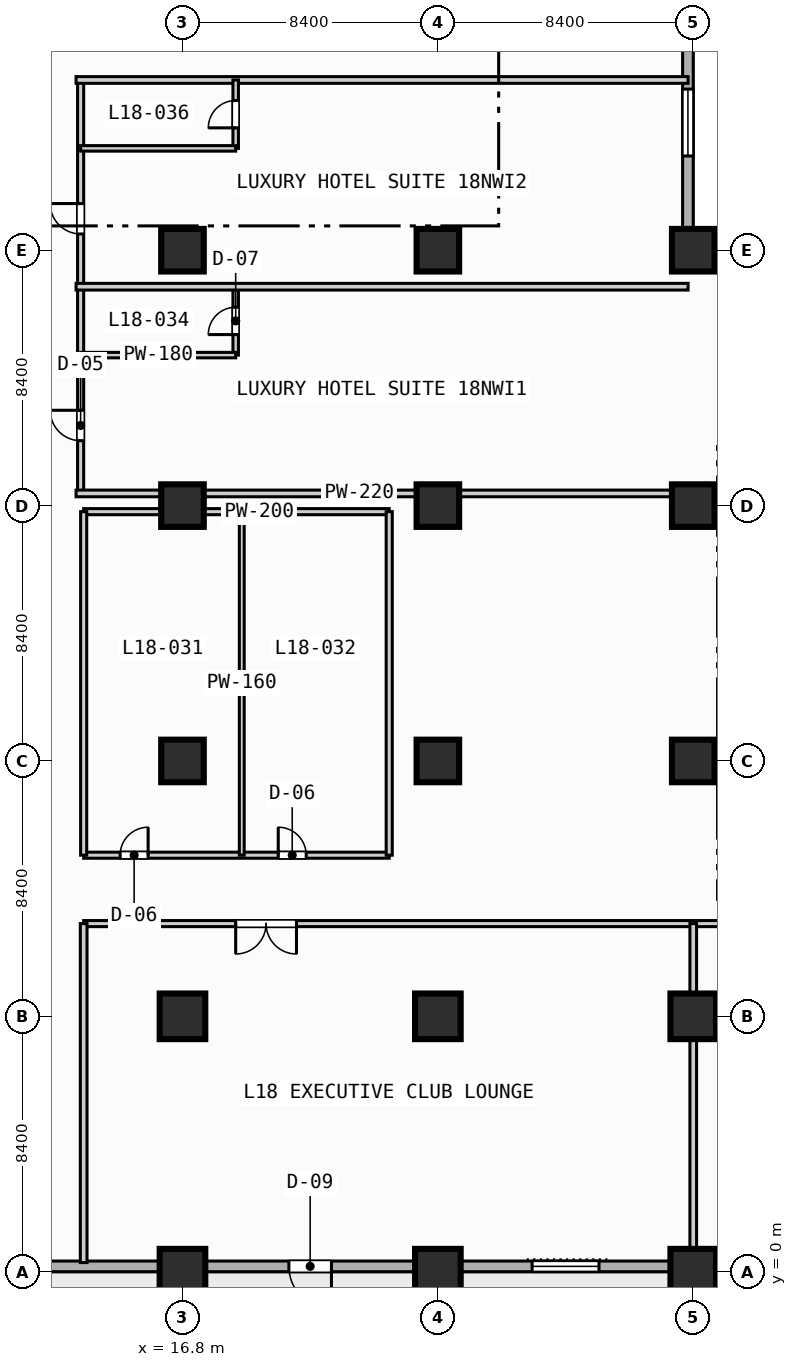
"""IFC4 building model, lengths in metres.
Left out: names, types, materials, properties, quantities, classifications, styles, units other than length and angle.
Written with IfcOpenShell. Run it as: python <this file> out.ifc"""

import sys

from ifc_helpers import new_model, si_unit, direction, frame, frame_2d, origin, origin_2d, place, context, subcontext, project, spatial, rectangle, extrude, element, fill, save


model = new_model("IFC4")
c1 = context("Model", 3, precision=1e-05, world=origin(), true_north=direction((0.0, 1.0)))
c2 = subcontext(c1, "Body", "Model", "MODEL_VIEW")
j1 = project(units=[si_unit("LENGTHUNIT", "METRE"), si_unit("PLANEANGLEUNIT", "RADIAN")], contexts=[c1])
p1 = place(None, origin())
s1 = spatial("IfcSite", under=j1, at=p1, CompositionType="ELEMENT")
p2 = place(p1, origin())
s2 = spatial("IfcBuilding", under=s1, at=p2, CompositionType="ELEMENT")
p3 = place(p2, frame((0.0, 0.0, 77.6)))
s3 = spatial("IfcBuildingStorey", under=s2, at=p3, CompositionType="ELEMENT", Elevation=77.6)
for number, where, z_axis, x_axis in (
    (1, (16.8, 0.0, 0.0), (0.0, 0.0, 1.0), (1.0, 0.0, 0.0)),
    (2, (16.8, 8.4, 0.0), (0.0, 0.0, 1.0), (1.0, 0.0, 0.0)),
):
    element("IfcColumn", number, at=place(p3, frame(where, z_axis=z_axis, x_axis=x_axis)), inside=s3, PredefinedType="COLUMN", context=c2, shape_type="SweptSolid", body=[
        extrude(rectangle(XDim=1.5, YDim=1.5, at=origin_2d()), origin(), (0.0, 0.0, 1.0), 3.8),
    ])
for number, where, z_axis, x_axis in (
    (3, (16.8, 16.8, 0.0), (0.0, 0.0, 1.0), (1.0, 0.0, 0.0)),
    (4, (16.8, 25.2, 0.0), (0.0, 0.0, 1.0), (1.0, 0.0, 0.0)),
    (5, (16.8, 33.6, 0.0), (0.0, 0.0, 1.0), (1.0, 0.0, 0.0)),
):
    element("IfcColumn", number, at=place(p3, frame(where, z_axis=z_axis, x_axis=x_axis)), inside=s3, PredefinedType="COLUMN", context=c2, shape_type="SweptSolid", body=[
        extrude(rectangle(XDim=1.4, YDim=1.4, at=origin_2d()), origin(), (0.0, 0.0, 1.0), 3.8),
    ])
for number, where, z_axis, x_axis in (
    (6, (25.2, 0.0, 0.0), (0.0, 0.0, 1.0), (1.0, 0.0, 0.0)),
    (7, (25.2, 8.4, 0.0), (0.0, 0.0, 1.0), (1.0, 0.0, 0.0)),
):
    element("IfcColumn", number, at=place(p3, frame(where, z_axis=z_axis, x_axis=x_axis)), inside=s3, PredefinedType="COLUMN", context=c2, shape_type="SweptSolid", body=[
        extrude(rectangle(XDim=1.5, YDim=1.5, at=origin_2d()), origin(), (0.0, 0.0, 1.0), 3.8),
    ])
for number, where, z_axis, x_axis in (
    (8, (25.2, 16.8, 0.0), (0.0, 0.0, 1.0), (1.0, 0.0, 0.0)),
    (9, (25.2, 25.2, 0.0), (0.0, 0.0, 1.0), (1.0, 0.0, 0.0)),
    (10, (25.2, 33.6, 0.0), (0.0, 0.0, 1.0), (1.0, 0.0, 0.0)),
):
    element("IfcColumn", number, at=place(p3, frame(where, z_axis=z_axis, x_axis=x_axis)), inside=s3, PredefinedType="COLUMN", context=c2, shape_type="SweptSolid", body=[
        extrude(rectangle(XDim=1.4, YDim=1.4, at=origin_2d()), origin(), (0.0, 0.0, 1.0), 3.8),
    ])
for number, where, z_axis, x_axis in (
    (11, (33.6, 0.0, 0.0), (0.0, 0.0, 1.0), (1.0, 0.0, 0.0)),
    (12, (33.6, 8.4, 0.0), (0.0, 0.0, 1.0), (1.0, 0.0, 0.0)),
):
    element("IfcColumn", number, at=place(p3, frame(where, z_axis=z_axis, x_axis=x_axis)), inside=s3, PredefinedType="COLUMN", context=c2, shape_type="SweptSolid", body=[
        extrude(rectangle(XDim=1.5, YDim=1.5, at=origin_2d()), origin(), (0.0, 0.0, 1.0), 3.8),
    ])
for number, where, z_axis, x_axis in (
    (13, (33.6, 16.8, 0.0), (0.0, 0.0, 1.0), (1.0, 0.0, 0.0)),
    (14, (33.6, 25.2, 0.0), (0.0, 0.0, 1.0), (1.0, 0.0, 0.0)),
    (15, (33.6, 33.6, 0.0), (0.0, 0.0, 1.0), (1.0, 0.0, 0.0)),
):
    element("IfcColumn", number, at=place(p3, frame(where, z_axis=z_axis, x_axis=x_axis)), inside=s3, PredefinedType="COLUMN", context=c2, shape_type="SweptSolid", body=[
        extrude(rectangle(XDim=1.4, YDim=1.4, at=origin_2d()), origin(), (0.0, 0.0, 1.0), 3.8),
    ])
p4 = place(p3, frame((33.425, 89.225, 0.0), z_axis=(0.0, 0.0, 1.0), x_axis=(0.0, -1.0, 0.0)))
e16 = element("IfcWall", 16, at=p4, inside=s3, PredefinedType="STANDARD", context=c2, shape_type="SweptSolid", body=[
    extrude(rectangle(XDim=55.8, YDim=0.35, at=frame_2d((27.9, 0.0))), origin(), (0.0, 0.0, 1.0), 3.55),
])
p5 = place(p4, frame((50.325, 0.0, 0.85)))
e17 = element("IfcOpeningElement", 17, at=p5, cuts=e16, PredefinedType="OPENING", context=c2, shape_type="SweptSolid", body=[
    extrude(rectangle(XDim=2.2, YDim=1.8, at=frame_2d((1.1, 0.9))), frame((0.0, 0.185, 0.0), z_axis=(0.0, -1.0, 0.0), x_axis=(1.0, 0.0, 0.0)), (0.0, 0.0, 1.0), 0.37),
])
p6 = place(p3, frame((33.425, 33.425, 0.0), z_axis=(0.0, 0.0, 1.0), x_axis=(1.0, 0.0, 0.0)))
e18 = element("IfcWall", 18, at=p6, inside=s3, PredefinedType="STANDARD", context=c2, shape_type="SweptSolid", body=[
    extrude(rectangle(XDim=55.8, YDim=0.35, at=frame_2d((27.9, 0.0))), origin(), (0.0, 0.0, 1.0), 3.55),
])
p7 = place(p6, frame((12.075, 0.0, 0.0)))
e19 = element("IfcOpeningElement", 19, at=p7, cuts=e18, PredefinedType="OPENING", context=c2, shape_type="SweptSolid", body=[
    extrude(rectangle(XDim=1.4, YDim=2.2, at=frame_2d((0.7, 1.1))), frame((0.0, 0.185, 0.0), z_axis=(0.0, -1.0, 0.0), x_axis=(1.0, 0.0, 0.0)), (0.0, 0.0, 1.0), 0.37),
])
p8 = place(p3, frame((89.225, 0.175, 0.0), z_axis=(0.0, 0.0, 1.0), x_axis=(-1.0, 0.0, 0.0)))
e20 = element("IfcWall", 20, at=p8, inside=s3, PredefinedType="STANDARD", context=c2, shape_type="SweptSolid", body=[
    extrude(rectangle(XDim=86.05, YDim=0.35, at=frame_2d((43.025, 0.0))), origin(), (0.0, 0.0, 1.0), 3.55),
])
p9 = place(p8, frame((67.525, 0.0, 0.0)))
e21 = element("IfcOpeningElement", 21, at=p9, cuts=e20, PredefinedType="OPENING", context=c2, shape_type="SweptSolid", body=[
    extrude(rectangle(XDim=1.4, YDim=2.2, at=frame_2d((0.7, 1.1))), frame((0.0, 0.185, 0.0), z_axis=(0.0, -1.0, 0.0), x_axis=(1.0, 0.0, 0.0)), (0.0, 0.0, 1.0), 0.37),
])
p10 = place(p8, frame((58.725, 0.0, 0.85)))
e22 = element("IfcOpeningElement", 22, at=p10, cuts=e20, PredefinedType="OPENING", context=c2, shape_type="SweptSolid", body=[
    extrude(rectangle(XDim=2.2, YDim=1.8, at=frame_2d((1.1, 0.9))), frame((0.0, 0.185, 0.0), z_axis=(0.0, -1.0, 0.0), x_axis=(1.0, 0.0, 0.0)), (0.0, 0.0, 1.0), 0.37),
])
p11 = place(p8, frame((50.325, 0.0, 0.85)))
e23 = element("IfcOpeningElement", 23, at=p11, cuts=e20, PredefinedType="OPENING", context=c2, shape_type="SweptSolid", body=[
    extrude(rectangle(XDim=2.2, YDim=1.8, at=frame_2d((1.1, 0.9))), frame((0.0, 0.185, 0.0), z_axis=(0.0, -1.0, 0.0), x_axis=(1.0, 0.0, 0.0)), (0.0, 0.0, 1.0), 0.37),
])
p12 = place(p8, frame((41.925, 0.0, 0.85)))
e24 = element("IfcOpeningElement", 24, at=p12, cuts=e20, PredefinedType="OPENING", context=c2, shape_type="SweptSolid", body=[
    extrude(rectangle(XDim=2.2, YDim=1.8, at=frame_2d((1.1, 0.9))), frame((0.0, 0.185, 0.0), z_axis=(0.0, -1.0, 0.0), x_axis=(1.0, 0.0, 0.0)), (0.0, 0.0, 1.0), 0.37),
])
p13 = place(p8, frame((27.575, 0.0, 0.85)))
e25 = element("IfcOpeningElement", 25, at=p13, cuts=e20, PredefinedType="OPENING", context=c2, shape_type="SweptSolid", body=[
    extrude(rectangle(XDim=1.8, YDim=1.8, at=frame_2d((0.9, 0.9))), frame((0.0, 0.185, 0.0), z_axis=(0.0, -1.0, 0.0), x_axis=(1.0, 0.0, 0.0)), (0.0, 0.0, 1.0), 0.37),
])
p14 = place(p8, frame((19.175, 0.0, 0.85)))
e26 = element("IfcOpeningElement", 26, at=p14, cuts=e20, PredefinedType="OPENING", context=c2, shape_type="SweptSolid", body=[
    extrude(rectangle(XDim=1.8, YDim=1.8, at=frame_2d((0.9, 0.9))), frame((0.0, 0.185, 0.0), z_axis=(0.0, -1.0, 0.0), x_axis=(1.0, 0.0, 0.0)), (0.0, 0.0, 1.0), 0.37),
])
p15 = place(p8, frame((10.775, 0.0, 0.85)))
e27 = element("IfcOpeningElement", 27, at=p15, cuts=e20, PredefinedType="OPENING", context=c2, shape_type="SweptSolid", body=[
    extrude(rectangle(XDim=1.8, YDim=1.8, at=frame_2d((0.9, 0.9))), frame((0.0, 0.185, 0.0), z_axis=(0.0, -1.0, 0.0), x_axis=(1.0, 0.0, 0.0)), (0.0, 0.0, 1.0), 0.37),
])
p16 = place(p8, frame((2.425, 0.0, 0.85)))
e28 = element("IfcOpeningElement", 28, at=p16, cuts=e20, PredefinedType="OPENING", context=c2, shape_type="SweptSolid", body=[
    extrude(rectangle(XDim=1.8, YDim=1.8, at=frame_2d((0.9, 0.9))), frame((0.0, 0.185, 0.0), z_axis=(0.0, -1.0, 0.0), x_axis=(1.0, 0.0, 0.0)), (0.0, 0.0, 1.0), 0.37),
])
p17 = place(p3, frame((13.55, 13.7, 0.0), z_axis=(0.0, 0.0, 1.0), x_axis=(1.0, 0.0, 0.0)))
e29 = element("IfcWall", 29, at=p17, inside=s3, PredefinedType="PARTITIONING", context=c2, shape_type="SweptSolid", body=[
    extrude(rectangle(XDim=10.05, YDim=0.2, at=frame_2d((5.025, 0.0))), origin(), (0.0, 0.0, 1.0), 3.55),
])
p18 = place(p17, frame((1.2, 0.0, 0.0)))
e30 = element("IfcOpeningElement", 30, at=p18, cuts=e29, PredefinedType="OPENING", context=c2, shape_type="SweptSolid", body=[
    extrude(rectangle(XDim=0.92, YDim=2.1, at=frame_2d((0.46, 1.05))), frame((0.0, 0.11, 0.0), z_axis=(0.0, -1.0, 0.0), x_axis=(1.0, 0.0, 0.0)), (0.0, 0.0, 1.0), 0.22),
])
p19 = place(p17, frame((6.4, 0.0, 0.0)))
e31 = element("IfcOpeningElement", 31, at=p19, cuts=e29, PredefinedType="OPENING", context=c2, shape_type="SweptSolid", body=[
    extrude(rectangle(XDim=0.92, YDim=2.1, at=frame_2d((0.46, 1.05))), frame((0.0, 0.11, 0.0), z_axis=(0.0, -1.0, 0.0), x_axis=(1.0, 0.0, 0.0)), (0.0, 0.0, 1.0), 0.22),
])
p20 = place(p3, frame((18.75, 13.7, 0.0), z_axis=(0.0, 0.0, 1.0), x_axis=(0.0, 1.0, 0.0)))
e32 = element("IfcWall", 32, at=p20, inside=s3, PredefinedType="PARTITIONING", context=c2, shape_type="SweptSolid", body=[
    extrude(rectangle(XDim=11.3, YDim=0.16, at=frame_2d((5.65, 0.0))), origin(), (0.0, 0.0, 1.0), 3.55),
])
p21 = place(p3, frame((13.55, 25.0, 0.0), z_axis=(0.0, 0.0, 1.0), x_axis=(1.0, 0.0, 0.0)))
e33 = element("IfcWall", 33, at=p21, inside=s3, PredefinedType="PARTITIONING", context=c2, shape_type="SweptSolid", body=[
    extrude(rectangle(XDim=10.05, YDim=0.2, at=frame_2d((5.025, 0.0))), origin(), (0.0, 0.0, 1.0), 2.8),
])
for number, where, z_axis, x_axis in (
    (34, (13.55, 13.7, 0.0), (0.0, 0.0, 1.0), (0.0, 1.0, 0.0)),
    (35, (23.6, 13.7, 0.0), (0.0, 0.0, 1.0), (0.0, 1.0, 0.0)),
):
    element("IfcWall", number, at=place(p3, frame(where, z_axis=z_axis, x_axis=x_axis)), inside=s3, PredefinedType="PARTITIONING", context=c2, shape_type="SweptSolid", body=[
        extrude(rectangle(XDim=11.3, YDim=0.2, at=frame_2d((5.65, 0.0))), origin(), (0.0, 0.0, 1.0), 3.55),
    ])
p22 = place(p3, frame((13.45, 25.6, 0.0), z_axis=(0.0, 0.0, 1.0), x_axis=(0.0, 1.0, 0.0)))
e36 = element("IfcWall", 36, at=p22, inside=s3, PredefinedType="PARTITIONING", context=c2, shape_type="SweptSolid", body=[
    extrude(rectangle(XDim=13.6, YDim=0.2, at=frame_2d((6.8, 0.0))), origin(), (0.0, 0.0, 1.0), 3.55),
])
p23 = place(p22, frame((1.735, 0.0, 0.0)))
e37 = element("IfcOpeningElement", 37, at=p23, cuts=e36, PredefinedType="OPENING", context=c2, shape_type="SweptSolid", body=[
    extrude(rectangle(XDim=1.0, YDim=2.15, at=frame_2d((0.5, 1.075))), frame((0.0, 0.11, 0.0), z_axis=(0.0, -1.0, 0.0), x_axis=(1.0, 0.0, 0.0)), (0.0, 0.0, 1.0), 0.22),
])
p24 = place(p22, frame((8.535, 0.0, 0.0)))
e38 = element("IfcOpeningElement", 38, at=p24, cuts=e36, PredefinedType="OPENING", context=c2, shape_type="SweptSolid", body=[
    extrude(rectangle(XDim=1.0, YDim=2.15, at=frame_2d((0.5, 1.075))), frame((0.0, 0.11, 0.0), z_axis=(0.0, -1.0, 0.0), x_axis=(1.0, 0.0, 0.0)), (0.0, 0.0, 1.0), 0.22),
])
p25 = place(p3, frame((13.3, 25.6, 0.0), z_axis=(0.0, 0.0, 1.0), x_axis=(1.0, 0.0, 0.0)))
e39 = element("IfcWall", 39, at=p25, inside=s3, PredefinedType="PARTITIONING", context=c2, shape_type="SweptSolid", body=[
    extrude(rectangle(XDim=20.13, YDim=0.22, at=frame_2d((10.065, 0.0))), origin(), (0.0, 0.0, 1.0), 3.55),
])
p26 = place(p3, frame((18.55, 30.15, 0.0), z_axis=(0.0, 0.0, 1.0), x_axis=(0.0, 1.0, 0.0)))
e40 = element("IfcWall", 40, at=p26, inside=s3, PredefinedType="PLUMBINGWALL", context=c2, shape_type="SweptSolid", body=[
    extrude(rectangle(XDim=2.25, YDim=0.18, at=frame_2d((1.125, 0.0))), origin(), (0.0, 0.0, 1.0), 3.55),
])
p27 = place(p26, frame((0.675, 0.0, 0.0)))
e41 = element("IfcOpeningElement", 41, at=p27, cuts=e40, PredefinedType="OPENING", context=c2, shape_type="SweptSolid", body=[
    extrude(rectangle(XDim=0.9, YDim=2.1, at=frame_2d((0.45, 1.05))), frame((0.0, 0.1, 0.0), z_axis=(0.0, -1.0, 0.0), x_axis=(1.0, 0.0, 0.0)), (0.0, 0.0, 1.0), 0.2),
])
p28 = place(p3, frame((13.45, 30.15, 0.0), z_axis=(0.0, 0.0, 1.0), x_axis=(1.0, 0.0, 0.0)))
e42 = element("IfcWall", 42, at=p28, inside=s3, PredefinedType="PLUMBINGWALL", context=c2, shape_type="SweptSolid", body=[
    extrude(rectangle(XDim=5.1, YDim=0.18, at=frame_2d((2.55, 0.0))), origin(), (0.0, 0.0, 1.0), 3.55),
])
for number, where, z_axis, x_axis in (
    (43, (13.3, 32.4, 0.0), (0.0, 0.0, 1.0), (1.0, 0.0, 0.0)),
    (44, (13.3, 39.2, 0.0), (0.0, 0.0, 1.0), (1.0, 0.0, 0.0)),
):
    element("IfcWall", number, at=place(p3, frame(where, z_axis=z_axis, x_axis=x_axis)), inside=s3, PredefinedType="PARTITIONING", context=c2, shape_type="SweptSolid", body=[
        extrude(rectangle(XDim=20.13, YDim=0.22, at=frame_2d((10.065, 0.0))), origin(), (0.0, 0.0, 1.0), 3.55),
    ])
p29 = place(p3, frame((18.55, 36.95, 0.0), z_axis=(0.0, 0.0, 1.0), x_axis=(0.0, 1.0, 0.0)))
e45 = element("IfcWall", 45, at=p29, inside=s3, PredefinedType="PLUMBINGWALL", context=c2, shape_type="SweptSolid", body=[
    extrude(rectangle(XDim=2.25, YDim=0.18, at=frame_2d((1.125, 0.0))), origin(), (0.0, 0.0, 1.0), 3.55),
])
p30 = place(p29, frame((0.675, 0.0, 0.0)))
e46 = element("IfcOpeningElement", 46, at=p30, cuts=e45, PredefinedType="OPENING", context=c2, shape_type="SweptSolid", body=[
    extrude(rectangle(XDim=0.9, YDim=2.1, at=frame_2d((0.45, 1.05))), frame((0.0, 0.1, 0.0), z_axis=(0.0, -1.0, 0.0), x_axis=(1.0, 0.0, 0.0)), (0.0, 0.0, 1.0), 0.2),
])
p31 = place(p3, frame((13.45, 36.95, 0.0), z_axis=(0.0, 0.0, 1.0), x_axis=(1.0, 0.0, 0.0)))
e47 = element("IfcWall", 47, at=p31, inside=s3, PredefinedType="PLUMBINGWALL", context=c2, shape_type="SweptSolid", body=[
    extrude(rectangle(XDim=5.1, YDim=0.18, at=frame_2d((2.55, 0.0))), origin(), (0.0, 0.0, 1.0), 3.55),
])
p32 = place(p3, frame((13.55, 11.45, 0.0), z_axis=(0.0, 0.0, 1.0), x_axis=(1.0, 0.0, 0.0)))
e48 = element("IfcWall", 48, at=p32, inside=s3, PredefinedType="PARTITIONING", context=c2, shape_type="SweptSolid", body=[
    extrude(rectangle(XDim=42.05, YDim=0.2, at=frame_2d((21.025, 0.0))), origin(), (0.0, 0.0, 1.0), 3.55),
])
p33 = place(p32, frame((5.0, 0.0, 0.0)))
e49 = element("IfcOpeningElement", 49, at=p33, cuts=e48, PredefinedType="OPENING", context=c2, shape_type="SweptSolid", body=[
    extrude(rectangle(XDim=2.0, YDim=2.15, at=frame_2d((1.0, 1.075))), frame((0.0, 0.11, 0.0), z_axis=(0.0, -1.0, 0.0), x_axis=(1.0, 0.0, 0.0)), (0.0, 0.0, 1.0), 0.22),
])
p34 = place(p32, frame((24.0, 0.0, 0.0)))
e50 = element("IfcOpeningElement", 50, at=p34, cuts=e48, PredefinedType="OPENING", context=c2, shape_type="SweptSolid", body=[
    extrude(rectangle(XDim=2.0, YDim=2.15, at=frame_2d((1.0, 1.075))), frame((0.0, 0.11, 0.0), z_axis=(0.0, -1.0, 0.0), x_axis=(1.0, 0.0, 0.0)), (0.0, 0.0, 1.0), 0.22),
])
p35 = place(p3, frame((13.55, 0.3, 0.0), z_axis=(0.0, 0.0, 1.0), x_axis=(0.0, 1.0, 0.0)))
e51 = element("IfcWall", 51, at=p35, inside=s3, PredefinedType="PARTITIONING", context=c2, shape_type="SweptSolid", body=[
    extrude(rectangle(XDim=11.15, YDim=0.22, at=frame_2d((5.575, 0.0))), origin(), (0.0, 0.0, 1.0), 3.55),
])
p36 = place(p3, frame((33.6, 0.3, 0.0), z_axis=(0.0, 0.0, 1.0), x_axis=(0.0, 1.0, 0.0)))
e52 = element("IfcWall", 52, at=p36, inside=s3, PredefinedType="PARTITIONING", context=c2, shape_type="SweptSolid", body=[
    extrude(rectangle(XDim=11.15, YDim=0.22, at=frame_2d((5.575, 0.0))), origin(), (0.0, 0.0, 1.0), 2.8),
])
p37 = place(p5, origin())
e53 = element("IfcWindow", 53, at=p37, inside=s3, PartitioningType="SINGLE_PANEL", PredefinedType="WINDOW", context=c2, shape_type="SweptSolid", body=[
    extrude(rectangle(XDim=2.2, YDim=1.8, at=frame_2d((1.1, 0.9))), frame((0.0, 0.03, 0.0), z_axis=(0.0, -1.0, 0.0), x_axis=(1.0, 0.0, 0.0)), (0.0, 0.0, 1.0), 0.06),
])
fill(e17, e53)
p38 = place(p9, origin())
e54 = element("IfcDoor", 54, at=p38, inside=s3, OperationType="SINGLE_SWING_LEFT", PredefinedType="DOOR", context=c2, shape_type="SweptSolid", body=[
    extrude(rectangle(XDim=1.4, YDim=2.2, at=frame_2d((0.7, 1.1))), frame((0.0, 0.025, 0.0), z_axis=(0.0, -1.0, 0.0), x_axis=(1.0, 0.0, 0.0)), (0.0, 0.0, 1.0), 0.05),
])
fill(e21, e54)
p39 = place(p10, origin())
e55 = element("IfcWindow", 55, at=p39, inside=s3, PartitioningType="SINGLE_PANEL", PredefinedType="WINDOW", context=c2, shape_type="SweptSolid", body=[
    extrude(rectangle(XDim=2.2, YDim=1.8, at=frame_2d((1.1, 0.9))), frame((0.0, 0.03, 0.0), z_axis=(0.0, -1.0, 0.0), x_axis=(1.0, 0.0, 0.0)), (0.0, 0.0, 1.0), 0.06),
])
fill(e22, e55)
p40 = place(p18, origin())
e56 = element("IfcDoor", 56, at=p40, inside=s3, OperationType="SINGLE_SWING_RIGHT", PredefinedType="DOOR", context=c2, shape_type="SweptSolid", body=[
    extrude(rectangle(XDim=0.92, YDim=2.1, at=frame_2d((0.46, 1.05))), frame((0.0, 0.025, 0.0), z_axis=(0.0, -1.0, 0.0), x_axis=(1.0, 0.0, 0.0)), (0.0, 0.0, 1.0), 0.05),
])
fill(e30, e56)
p41 = place(p19, origin())
e57 = element("IfcDoor", 57, at=p41, inside=s3, OperationType="SINGLE_SWING_LEFT", PredefinedType="DOOR", context=c2, shape_type="SweptSolid", body=[
    extrude(rectangle(XDim=0.92, YDim=2.1, at=frame_2d((0.46, 1.05))), frame((0.0, 0.025, 0.0), z_axis=(0.0, -1.0, 0.0), x_axis=(1.0, 0.0, 0.0)), (0.0, 0.0, 1.0), 0.05),
])
fill(e31, e57)
p42 = place(p23, origin())
e58 = element("IfcDoor", 58, at=p42, inside=s3, OperationType="SINGLE_SWING_RIGHT", PredefinedType="DOOR", context=c2, shape_type="SweptSolid", body=[
    extrude(rectangle(XDim=1.0, YDim=2.15, at=frame_2d((0.5, 1.075))), frame((0.0, 0.025, 0.0), z_axis=(0.0, -1.0, 0.0), x_axis=(1.0, 0.0, 0.0)), (0.0, 0.0, 1.0), 0.05),
])
fill(e37, e58)
p43 = place(p24, origin())
e59 = element("IfcDoor", 59, at=p43, inside=s3, OperationType="SINGLE_SWING_RIGHT", PredefinedType="DOOR", context=c2, shape_type="SweptSolid", body=[
    extrude(rectangle(XDim=1.0, YDim=2.15, at=frame_2d((0.5, 1.075))), frame((0.0, 0.025, 0.0), z_axis=(0.0, -1.0, 0.0), x_axis=(1.0, 0.0, 0.0)), (0.0, 0.0, 1.0), 0.05),
])
fill(e38, e59)
p44 = place(p27, origin())
e60 = element("IfcDoor", 60, at=p44, inside=s3, OperationType="SINGLE_SWING_LEFT", PredefinedType="DOOR", context=c2, shape_type="SweptSolid", body=[
    extrude(rectangle(XDim=0.9, YDim=2.1, at=frame_2d((0.45, 1.05))), frame((0.0, 0.025, 0.0), z_axis=(0.0, -1.0, 0.0), x_axis=(1.0, 0.0, 0.0)), (0.0, 0.0, 1.0), 0.05),
])
fill(e41, e60)
p45 = place(p30, origin())
e61 = element("IfcDoor", 61, at=p45, inside=s3, OperationType="SINGLE_SWING_LEFT", PredefinedType="DOOR", context=c2, shape_type="SweptSolid", body=[
    extrude(rectangle(XDim=0.9, YDim=2.1, at=frame_2d((0.45, 1.05))), frame((0.0, 0.025, 0.0), z_axis=(0.0, -1.0, 0.0), x_axis=(1.0, 0.0, 0.0)), (0.0, 0.0, 1.0), 0.05),
])
fill(e46, e61)
p46 = place(p33, origin())
e62 = element("IfcDoor", 62, at=p46, inside=s3, OperationType="SINGLE_SWING_RIGHT", PredefinedType="DOOR", context=c2, shape_type="SweptSolid", body=[
    extrude(rectangle(XDim=2.0, YDim=2.15, at=frame_2d((1.0, 1.075))), frame((0.0, 0.025, 0.0), z_axis=(0.0, -1.0, 0.0), x_axis=(1.0, 0.0, 0.0)), (0.0, 0.0, 1.0), 0.05),
])
fill(e49, e62)
save(model, sys.argv[1])
